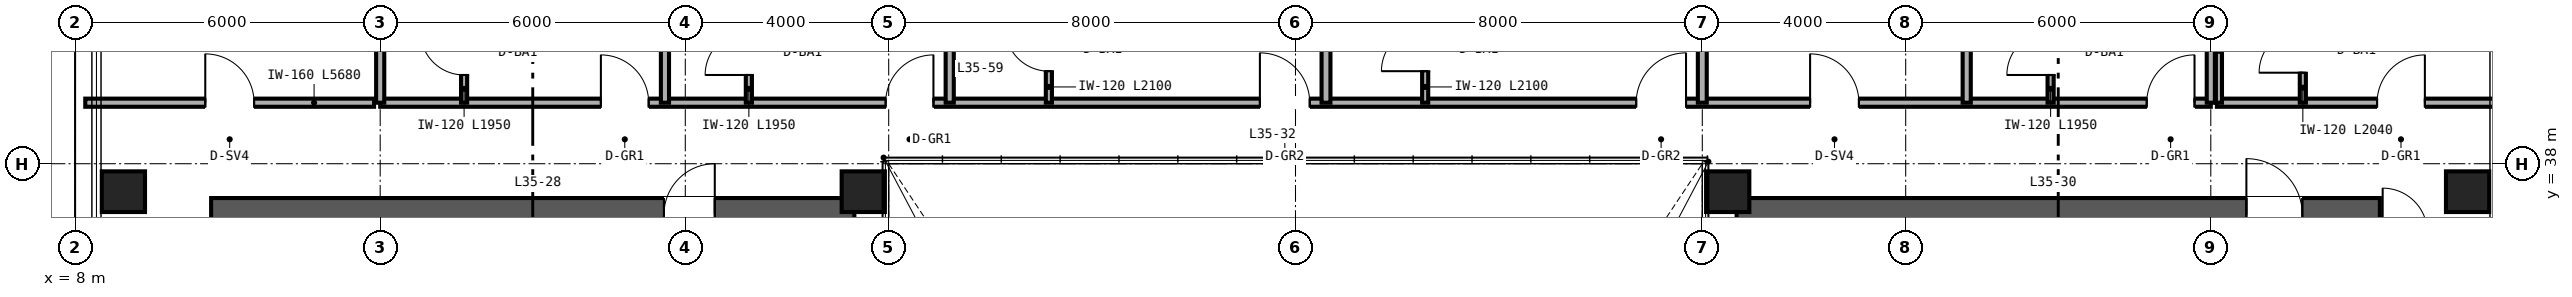
"""IFC4 building model, lengths in metres.
Left out: names, types, materials, properties, quantities, classifications, styles, units other than length and angle.
Written with IfcOpenShell. Run it as: python <this file> out.ifc"""

import sys

from ifc_helpers import new_model, si_unit, direction, frame, frame_2d, origin, origin_2d, place, context, subcontext, project, spatial, rectangle, hollow_rectangle, extrude, source, transform, mapped, element, fill, save


model = new_model("IFC4")
c1 = context("Model", 3, precision=1e-05, world=origin(), true_north=direction((0.0, 1.0)))
c2 = subcontext(c1, "Body", "Model", "MODEL_VIEW")
j1 = project(units=[si_unit("LENGTHUNIT", "METRE"), si_unit("PLANEANGLEUNIT", "RADIAN")], contexts=[c1])
p1 = place(None, origin())
s1 = spatial("IfcSite", under=j1, at=p1, CompositionType="ELEMENT")
p2 = place(p1, origin())
s2 = spatial("IfcBuilding", under=s1, at=p2, CompositionType="ELEMENT")
p3 = place(p2, frame((0.0, 0.0, 140.4)))
s3 = spatial("IfcBuildingStorey", under=s2, at=p3, CompositionType="ELEMENT", Elevation=140.4)
p4 = place(p3, frame((10.675, 37.0, 0.0), z_axis=(0.0, 0.0, 1.0), x_axis=(1.0, 0.0, 0.0)))
e1 = element("IfcWall", 1, at=p4, inside=s3, PredefinedType="SHEAR", context=c2, shape_type="SweptSolid", body=[
    extrude(rectangle(XDim=12.65, YDim=0.65, at=frame_2d((6.325, 0.0))), origin(), (0.0, 0.0, 1.0), 3.36),
])
p5 = place(p4, frame((8.905, 0.0, 0.0)))
e2 = element("IfcOpeningElement", 2, at=p5, cuts=e1, PredefinedType="OPENING", context=c2, shape_type="SweptSolid", body=[
    extrude(rectangle(XDim=1.0, YDim=2.15, at=frame_2d((0.5, 1.075))), frame((0.0, 0.335, 0.0), z_axis=(0.0, -1.0, 0.0), x_axis=(1.0, 0.0, 0.0)), (0.0, 0.0, 1.0), 0.67),
])
p6 = place(p3, frame((40.675, 37.0, 0.0), z_axis=(0.0, 0.0, 1.0), x_axis=(1.0, 0.0, 0.0)))
e3 = element("IfcWall", 3, at=p6, inside=s3, PredefinedType="SHEAR", context=c2, shape_type="SweptSolid", body=[
    extrude(rectangle(XDim=12.65, YDim=0.65, at=frame_2d((6.325, 0.0))), origin(), (0.0, 0.0, 1.0), 3.36),
])
p7 = place(p6, frame((10.025, 0.0, 0.0)))
e4 = element("IfcOpeningElement", 4, at=p7, cuts=e3, PredefinedType="OPENING", context=c2, shape_type="SweptSolid", body=[
    extrude(rectangle(XDim=1.1, YDim=2.15, at=frame_2d((0.55, 1.075))), frame((0.0, 0.335, 0.0), z_axis=(0.0, -1.0, 0.0), x_axis=(1.0, 0.0, 0.0)), (0.0, 0.0, 1.0), 0.67),
])
m1 = source(origin(), c2, "Body", "SweptSolid", [
    extrude(hollow_rectangle(XDim=0.85, YDim=0.8, WallThickness=0.032, at=origin_2d()), origin(), (0.0, 0.0, 1.0), 3.36),
])
for number, where, z_axis, x_axis in (
    (5, (8.95, 37.45, 0.0), (0.0, 0.0, 1.0), (1.0, 0.0, 0.0)),
    (6, (23.5, 37.45, 0.0), (0.0, 0.0, 1.0), (1.0, 0.0, 0.0)),
    (7, (40.5, 37.45, 0.0), (0.0, 0.0, 1.0), (1.0, 0.0, 0.0)),
    (8, (55.05, 37.45, 0.0), (0.0, 0.0, 1.0), (1.0, 0.0, 0.0)),
):
    element("IfcColumn", number, at=place(p3, frame(where, z_axis=z_axis, x_axis=x_axis)), inside=s3, PredefinedType="COLUMN", context=c2, shape_type="MappedRepresentation", body=[
        mapped(m1, transform((0.0, 0.0, 0.0), scale=1.0)),
    ])
p8 = place(p3, frame((8.2, 39.2, 0.0), z_axis=(0.0, 0.0, 1.0), x_axis=(1.0, 0.0, 0.0)))
e9 = element("IfcWall", 9, at=p8, inside=s3, PredefinedType="PARTITIONING", context=c2, shape_type="SweptSolid", body=[
    extrude(rectangle(XDim=5.68, YDim=0.16, at=frame_2d((2.84, 0.0))), origin(), (0.0, 0.0, 1.0), 3.36),
])
p9 = place(p8, frame((2.36, 0.0, 0.0)))
e10 = element("IfcOpeningElement", 10, at=p9, cuts=e9, PredefinedType="OPENING", context=c2, shape_type="SweptSolid", body=[
    extrude(rectangle(XDim=0.96, YDim=2.15, at=frame_2d((0.48, 1.075))), frame((0.0, 0.09, 0.0), z_axis=(0.0, -1.0, 0.0), x_axis=(1.0, 0.0, 0.0)), (0.0, 0.0, 1.0), 0.18),
])
p10 = place(p3, frame((50.12, 39.2, 0.0), z_axis=(0.0, 0.0, 1.0), x_axis=(1.0, 0.0, 0.0)))
e11 = element("IfcWall", 11, at=p10, inside=s3, PredefinedType="PARTITIONING", context=c2, shape_type="SweptSolid", body=[
    extrude(rectangle(XDim=5.68, YDim=0.16, at=frame_2d((2.84, 0.0))), origin(), (0.0, 0.0, 1.0), 3.36),
])
p11 = place(p10, frame((3.15, 0.0, 0.0)))
e12 = element("IfcOpeningElement", 12, at=p11, cuts=e11, PredefinedType="OPENING", context=c2, shape_type="SweptSolid", body=[
    extrude(rectangle(XDim=0.94, YDim=2.15, at=frame_2d((0.47, 1.075))), frame((0.0, 0.09, 0.0), z_axis=(0.0, -1.0, 0.0), x_axis=(1.0, 0.0, 0.0)), (0.0, 0.0, 1.0), 0.18),
])
p12 = place(p3, frame((51.81, 39.2, 0.0), z_axis=(0.0, 0.0, 1.0), x_axis=(0.0, 1.0, 0.0)))
e13 = element("IfcWall", 13, at=p12, inside=s3, PredefinedType="PARTITIONING", context=c2, shape_type="SweptSolid", body=[
    extrude(rectangle(XDim=2.04, YDim=0.12, at=frame_2d((1.02, 0.0))), origin(), (0.0, 0.0, 1.0), 3.36),
])
p13 = place(p12, frame((0.59, 0.0, 0.0)))
e14 = element("IfcOpeningElement", 14, at=p13, cuts=e13, PredefinedType="OPENING", context=c2, shape_type="SweptSolid", body=[
    extrude(rectangle(XDim=0.86, YDim=2.1, at=frame_2d((0.43, 1.05))), frame((0.0, 0.07, 0.0), z_axis=(0.0, -1.0, 0.0), x_axis=(1.0, 0.0, 0.0)), (0.0, 0.0, 1.0), 0.14),
])
p14 = place(p3, frame((50.16, 39.2, 0.0), z_axis=(0.0, 0.0, 1.0), x_axis=(0.0, 1.0, 0.0)))
e15 = element("IfcWall", 15, at=p14, inside=s3, PredefinedType="PARTITIONING", context=c2, shape_type="SweptSolid", body=[
    extrude(rectangle(XDim=2.04, YDim=0.12, at=frame_2d((1.02, 0.0))), origin(), (0.0, 0.0, 1.0), 3.36),
])
p15 = place(p3, frame((14.0, 39.2, 0.0), z_axis=(0.0, 0.0, 1.0), x_axis=(1.0, 0.0, 0.0)))
e16 = element("IfcWall", 16, at=p15, inside=s3, PredefinedType="PARTITIONING", context=c2, shape_type="SweptSolid", body=[
    extrude(rectangle(XDim=36.0, YDim=0.16, at=frame_2d((18.0, 0.0))), origin(), (0.0, 0.0, 1.0), 2.581),
])
p16 = place(p15, frame((4.34, 0.0, 0.0)))
e17 = element("IfcOpeningElement", 17, at=p16, cuts=e16, PredefinedType="OPENING", context=c2, shape_type="SweptSolid", body=[
    extrude(rectangle(XDim=0.94, YDim=2.15, at=frame_2d((0.47, 1.075))), frame((0.0, 0.09, 0.0), z_axis=(0.0, -1.0, 0.0), x_axis=(1.0, 0.0, 0.0)), (0.0, 0.0, 1.0), 0.18),
])
p17 = place(p15, frame((9.94, 0.0, 0.0)))
e18 = element("IfcOpeningElement", 18, at=p17, cuts=e16, PredefinedType="OPENING", context=c2, shape_type="SweptSolid", body=[
    extrude(rectangle(XDim=0.94, YDim=2.15, at=frame_2d((0.47, 1.075))), frame((0.0, 0.09, 0.0), z_axis=(0.0, -1.0, 0.0), x_axis=(1.0, 0.0, 0.0)), (0.0, 0.0, 1.0), 0.18),
])
p18 = place(p15, frame((17.3, 0.0, 0.0)))
e19 = element("IfcOpeningElement", 19, at=p18, cuts=e16, PredefinedType="OPENING", context=c2, shape_type="SweptSolid", body=[
    extrude(rectangle(XDim=0.98, YDim=2.2, at=frame_2d((0.49, 1.1))), frame((0.0, 0.09, 0.0), z_axis=(0.0, -1.0, 0.0), x_axis=(1.0, 0.0, 0.0)), (0.0, 0.0, 1.0), 0.18),
])
p19 = place(p15, frame((24.7, 0.0, 0.0)))
e20 = element("IfcOpeningElement", 20, at=p19, cuts=e16, PredefinedType="OPENING", context=c2, shape_type="SweptSolid", body=[
    extrude(rectangle(XDim=0.98, YDim=2.2, at=frame_2d((0.49, 1.1))), frame((0.0, 0.09, 0.0), z_axis=(0.0, -1.0, 0.0), x_axis=(1.0, 0.0, 0.0)), (0.0, 0.0, 1.0), 0.18),
])
p20 = place(p15, frame((28.12, 0.0, 0.0)))
e21 = element("IfcOpeningElement", 21, at=p20, cuts=e16, PredefinedType="OPENING", context=c2, shape_type="SweptSolid", body=[
    extrude(rectangle(XDim=0.96, YDim=2.15, at=frame_2d((0.48, 1.075))), frame((0.0, 0.09, 0.0), z_axis=(0.0, -1.0, 0.0), x_axis=(1.0, 0.0, 0.0)), (0.0, 0.0, 1.0), 0.18),
])
p21 = place(p15, frame((34.74, 0.0, 0.0)))
e22 = element("IfcOpeningElement", 22, at=p21, cuts=e16, PredefinedType="OPENING", context=c2, shape_type="SweptSolid", body=[
    extrude(rectangle(XDim=0.94, YDim=2.15, at=frame_2d((0.47, 1.075))), frame((0.0, 0.09, 0.0), z_axis=(0.0, -1.0, 0.0), x_axis=(1.0, 0.0, 0.0)), (0.0, 0.0, 1.0), 0.18),
])
for number, where, z_axis, x_axis in (
    (23, (14.0, 39.2, 0.0), (0.0, 0.0, 1.0), (0.0, 1.0, 0.0)),
    (24, (50.0, 39.2, 0.0), (0.0, 0.0, 1.0), (0.0, 1.0, 0.0)),
    (25, (19.6, 39.2, 0.0), (0.0, 0.0, 1.0), (0.0, 1.0, 0.0)),
):
    element("IfcWall", number, at=place(p3, frame(where, z_axis=z_axis, x_axis=x_axis)), inside=s3, PredefinedType="PARTITIONING", context=c2, shape_type="SweptSolid", body=[
        extrude(rectangle(XDim=10.44, YDim=0.16, at=frame_2d((5.22, 0.0))), origin(), (0.0, 0.0, 1.0), 2.667),
    ])
p22 = place(p3, frame((15.65, 39.2, 0.0), z_axis=(0.0, 0.0, 1.0), x_axis=(0.0, 1.0, 0.0)))
e26 = element("IfcWall", 26, at=p22, inside=s3, PredefinedType="PARTITIONING", context=c2, shape_type="SweptSolid", body=[
    extrude(rectangle(XDim=1.95, YDim=0.12, at=frame_2d((0.975, 0.0))), origin(), (0.0, 0.0, 1.0), 3.36),
])
p23 = place(p22, frame((0.545, 0.0, 0.0)))
e27 = element("IfcOpeningElement", 27, at=p23, cuts=e26, PredefinedType="OPENING", context=c2, shape_type="SweptSolid", body=[
    extrude(rectangle(XDim=0.86, YDim=2.1, at=frame_2d((0.43, 1.05))), frame((0.0, 0.07, 0.0), z_axis=(0.0, -1.0, 0.0), x_axis=(1.0, 0.0, 0.0)), (0.0, 0.0, 1.0), 0.14),
])
p24 = place(p3, frame((25.2, 39.2, 0.0), z_axis=(0.0, 0.0, 1.0), x_axis=(0.0, 1.0, 0.0)))
e28 = element("IfcWall", 28, at=p24, inside=s3, PredefinedType="PARTITIONING", context=c2, shape_type="SweptSolid", body=[
    extrude(rectangle(XDim=10.44, YDim=0.16, at=frame_2d((5.22, 0.0))), origin(), (0.0, 0.0, 1.0), 2.433),
])
p25 = place(p3, frame((21.25, 39.2, 0.0), z_axis=(0.0, 0.0, 1.0), x_axis=(0.0, 1.0, 0.0)))
e29 = element("IfcWall", 29, at=p25, inside=s3, PredefinedType="PARTITIONING", context=c2, shape_type="SweptSolid", body=[
    extrude(rectangle(XDim=1.95, YDim=0.12, at=frame_2d((0.975, 0.0))), origin(), (0.0, 0.0, 1.0), 3.36),
])
p26 = place(p25, frame((0.545, 0.0, 0.0)))
e30 = element("IfcOpeningElement", 30, at=p26, cuts=e29, PredefinedType="OPENING", context=c2, shape_type="SweptSolid", body=[
    extrude(rectangle(XDim=0.86, YDim=2.1, at=frame_2d((0.43, 1.05))), frame((0.0, 0.07, 0.0), z_axis=(0.0, -1.0, 0.0), x_axis=(1.0, 0.0, 0.0)), (0.0, 0.0, 1.0), 0.14),
])
p27 = place(p3, frame((32.6, 39.2, 0.0), z_axis=(0.0, 0.0, 1.0), x_axis=(0.0, 1.0, 0.0)))
e31 = element("IfcWall", 31, at=p27, inside=s3, PredefinedType="PARTITIONING", context=c2, shape_type="SweptSolid", body=[
    extrude(rectangle(XDim=10.44, YDim=0.175, at=frame_2d((5.22, 0.0))), origin(), (0.0, 0.0, 1.0), 2.433),
])
p28 = place(p3, frame((27.15, 39.2, 0.0), z_axis=(0.0, 0.0, 1.0), x_axis=(0.0, 1.0, 0.0)))
e32 = element("IfcWall", 32, at=p28, inside=s3, PredefinedType="PARTITIONING", context=c2, shape_type="SweptSolid", body=[
    extrude(rectangle(XDim=2.1, YDim=0.12, at=frame_2d((1.05, 0.0))), origin(), (0.0, 0.0, 1.0), 3.36),
])
p29 = place(p28, frame((0.62, 0.0, 0.0)))
e33 = element("IfcOpeningElement", 33, at=p29, cuts=e32, PredefinedType="OPENING", context=c2, shape_type="SweptSolid", body=[
    extrude(rectangle(XDim=0.86, YDim=2.1, at=frame_2d((0.43, 1.05))), frame((0.0, 0.07, 0.0), z_axis=(0.0, -1.0, 0.0), x_axis=(1.0, 0.0, 0.0)), (0.0, 0.0, 1.0), 0.14),
])
p30 = place(p3, frame((40.0, 39.2, 0.0), z_axis=(0.0, 0.0, 1.0), x_axis=(0.0, 1.0, 0.0)))
e34 = element("IfcWall", 34, at=p30, inside=s3, PredefinedType="PARTITIONING", context=c2, shape_type="SweptSolid", body=[
    extrude(rectangle(XDim=10.44, YDim=0.175, at=frame_2d((5.22, 0.0))), origin(), (0.0, 0.0, 1.0), 2.433),
])
p31 = place(p3, frame((34.55, 39.2, 0.0), z_axis=(0.0, 0.0, 1.0), x_axis=(0.0, 1.0, 0.0)))
e35 = element("IfcWall", 35, at=p31, inside=s3, PredefinedType="PARTITIONING", context=c2, shape_type="SweptSolid", body=[
    extrude(rectangle(XDim=2.1, YDim=0.12, at=frame_2d((1.05, 0.0))), origin(), (0.0, 0.0, 1.0), 3.36),
])
p32 = place(p31, frame((0.62, 0.0, 0.0)))
e36 = element("IfcOpeningElement", 36, at=p32, cuts=e35, PredefinedType="OPENING", context=c2, shape_type="SweptSolid", body=[
    extrude(rectangle(XDim=0.86, YDim=2.1, at=frame_2d((0.43, 1.05))), frame((0.0, 0.07, 0.0), z_axis=(0.0, -1.0, 0.0), x_axis=(1.0, 0.0, 0.0)), (0.0, 0.0, 1.0), 0.14),
])
p33 = place(p3, frame((45.2, 39.2, 0.0), z_axis=(0.0, 0.0, 1.0), x_axis=(0.0, 1.0, 0.0)))
e37 = element("IfcWall", 37, at=p33, inside=s3, PredefinedType="PARTITIONING", context=c2, shape_type="SweptSolid", body=[
    extrude(rectangle(XDim=10.44, YDim=0.16, at=frame_2d((5.22, 0.0))), origin(), (0.0, 0.0, 1.0), 2.667),
])
p34 = place(p3, frame((46.85, 39.2, 0.0), z_axis=(0.0, 0.0, 1.0), x_axis=(0.0, 1.0, 0.0)))
e38 = element("IfcWall", 38, at=p34, inside=s3, PredefinedType="PARTITIONING", context=c2, shape_type="SweptSolid", body=[
    extrude(rectangle(XDim=1.95, YDim=0.12, at=frame_2d((0.975, 0.0))), origin(), (0.0, 0.0, 1.0), 3.36),
])
p35 = place(p34, frame((0.545, 0.0, 0.0)))
e39 = element("IfcOpeningElement", 39, at=p35, cuts=e38, PredefinedType="OPENING", context=c2, shape_type="SweptSolid", body=[
    extrude(rectangle(XDim=0.86, YDim=2.1, at=frame_2d((0.43, 1.05))), frame((0.0, 0.07, 0.0), z_axis=(0.0, -1.0, 0.0), x_axis=(1.0, 0.0, 0.0)), (0.0, 0.0, 1.0), 0.14),
])
m2 = source(origin(), c2, "Body", "SweptSolid", [
    extrude(rectangle(XDim=1.0, YDim=2.15, at=frame_2d((0.5, 1.075))), frame((0.0, 0.025, 0.0), z_axis=(0.0, -1.0, 0.0), x_axis=(1.0, 0.0, 0.0)), (0.0, 0.0, 1.0), 0.05),
])
p36 = place(p5, origin())
e40 = element("IfcDoor", 40, at=p36, inside=s3, OperationType="SINGLE_SWING_RIGHT", PredefinedType="DOOR", context=c2, shape_type="MappedRepresentation", body=[
    mapped(m2, transform((0.0, 0.0, 0.0), scale=1.0)),
])
fill(e2, e40)
m3 = source(origin(), c2, "Body", "SweptSolid", [
    extrude(rectangle(XDim=1.1, YDim=2.15, at=frame_2d((0.55, 1.075))), frame((0.0, 0.025, 0.0), z_axis=(0.0, -1.0, 0.0), x_axis=(1.0, 0.0, 0.0)), (0.0, 0.0, 1.0), 0.05),
])
p37 = place(p7, origin())
e41 = element("IfcDoor", 41, at=p37, inside=s3, OperationType="SINGLE_SWING_LEFT", PredefinedType="DOOR", context=c2, shape_type="MappedRepresentation", body=[
    mapped(m3, transform((0.0, 0.0, 0.0), scale=1.0)),
])
fill(e4, e41)
m4 = source(origin(), c2, "Body", "SweptSolid", [
    extrude(rectangle(XDim=0.96, YDim=2.15, at=frame_2d((0.48, 1.075))), frame((0.0, 0.025, 0.0), z_axis=(0.0, -1.0, 0.0), x_axis=(1.0, 0.0, 0.0)), (0.0, 0.0, 1.0), 0.05),
])
p38 = place(p9, origin())
e42 = element("IfcDoor", 42, at=p38, inside=s3, OperationType="SINGLE_SWING_LEFT", PredefinedType="DOOR", context=c2, shape_type="MappedRepresentation", body=[
    mapped(m4, transform((0.0, 0.0, 0.0), scale=1.0)),
])
fill(e10, e42)
m5 = source(origin(), c2, "Body", "SweptSolid", [
    extrude(rectangle(XDim=0.86, YDim=2.1, at=frame_2d((0.43, 1.05))), frame((0.0, 0.025, 0.0), z_axis=(0.0, -1.0, 0.0), x_axis=(1.0, 0.0, 0.0)), (0.0, 0.0, 1.0), 0.05),
])
p39 = place(p13, origin())
e43 = element("IfcDoor", 43, at=p39, inside=s3, OperationType="SINGLE_SWING_LEFT", PredefinedType="DOOR", context=c2, shape_type="MappedRepresentation", body=[
    mapped(m5, transform((0.0, 0.0, 0.0), scale=1.0)),
])
fill(e14, e43)
m6 = source(origin(), c2, "Body", "SweptSolid", [
    extrude(rectangle(XDim=0.94, YDim=2.15, at=frame_2d((0.47, 1.075))), frame((0.0, 0.025, 0.0), z_axis=(0.0, -1.0, 0.0), x_axis=(1.0, 0.0, 0.0)), (0.0, 0.0, 1.0), 0.05),
])
p40 = place(p11, origin())
e44 = element("IfcDoor", 44, at=p40, inside=s3, OperationType="SINGLE_SWING_RIGHT", PredefinedType="DOOR", context=c2, shape_type="MappedRepresentation", body=[
    mapped(m6, transform((0.0, 0.0, 0.0), scale=1.0)),
])
fill(e12, e44)
p41 = place(p23, origin())
e45 = element("IfcDoor", 45, at=p41, inside=s3, OperationType="SINGLE_SWING_RIGHT", PredefinedType="DOOR", context=c2, shape_type="MappedRepresentation", body=[
    mapped(m5, transform((0.0, 0.0, 0.0), scale=1.0)),
])
fill(e27, e45)
p42 = place(p26, origin())
e46 = element("IfcDoor", 46, at=p42, inside=s3, OperationType="SINGLE_SWING_LEFT", PredefinedType="DOOR", context=c2, shape_type="MappedRepresentation", body=[
    mapped(m5, transform((0.0, 0.0, 0.0), scale=1.0)),
])
fill(e30, e46)
p43 = place(p29, origin())
e47 = element("IfcDoor", 47, at=p43, inside=s3, OperationType="SINGLE_SWING_RIGHT", PredefinedType="DOOR", context=c2, shape_type="MappedRepresentation", body=[
    mapped(m5, transform((0.0, 0.0, 0.0), scale=1.0)),
])
fill(e33, e47)
p44 = place(p32, origin())
e48 = element("IfcDoor", 48, at=p44, inside=s3, OperationType="SINGLE_SWING_LEFT", PredefinedType="DOOR", context=c2, shape_type="MappedRepresentation", body=[
    mapped(m5, transform((0.0, 0.0, 0.0), scale=1.0)),
])
fill(e36, e48)
p45 = place(p35, origin())
e49 = element("IfcDoor", 49, at=p45, inside=s3, OperationType="SINGLE_SWING_LEFT", PredefinedType="DOOR", context=c2, shape_type="MappedRepresentation", body=[
    mapped(m5, transform((0.0, 0.0, 0.0), scale=1.0)),
])
fill(e39, e49)
p46 = place(p16, origin())
e50 = element("IfcDoor", 50, at=p46, inside=s3, OperationType="SINGLE_SWING_LEFT", PredefinedType="DOOR", context=c2, shape_type="MappedRepresentation", body=[
    mapped(m6, transform((0.0, 0.0, 0.0), scale=1.0)),
])
fill(e17, e50)
p47 = place(p17, origin())
e51 = element("IfcDoor", 51, at=p47, inside=s3, OperationType="SINGLE_SWING_RIGHT", PredefinedType="DOOR", context=c2, shape_type="MappedRepresentation", body=[
    mapped(m6, transform((0.0, 0.0, 0.0), scale=1.0)),
])
fill(e18, e51)
m7 = source(origin(), c2, "Body", "SweptSolid", [
    extrude(rectangle(XDim=0.98, YDim=2.2, at=frame_2d((0.49, 1.1))), frame((0.0, 0.025, 0.0), z_axis=(0.0, -1.0, 0.0), x_axis=(1.0, 0.0, 0.0)), (0.0, 0.0, 1.0), 0.05),
])
p48 = place(p18, origin())
e52 = element("IfcDoor", 52, at=p48, inside=s3, OperationType="SINGLE_SWING_LEFT", PredefinedType="DOOR", context=c2, shape_type="MappedRepresentation", body=[
    mapped(m7, transform((0.0, 0.0, 0.0), scale=1.0)),
])
fill(e19, e52)
p49 = place(p19, origin())
e53 = element("IfcDoor", 53, at=p49, inside=s3, OperationType="SINGLE_SWING_RIGHT", PredefinedType="DOOR", context=c2, shape_type="MappedRepresentation", body=[
    mapped(m7, transform((0.0, 0.0, 0.0), scale=1.0)),
])
fill(e20, e53)
p50 = place(p20, origin())
e54 = element("IfcDoor", 54, at=p50, inside=s3, OperationType="SINGLE_SWING_LEFT", PredefinedType="DOOR", context=c2, shape_type="MappedRepresentation", body=[
    mapped(m4, transform((0.0, 0.0, 0.0), scale=1.0)),
])
fill(e21, e54)
p51 = place(p21, origin())
e55 = element("IfcDoor", 55, at=p51, inside=s3, OperationType="SINGLE_SWING_RIGHT", PredefinedType="DOOR", context=c2, shape_type="MappedRepresentation", body=[
    mapped(m6, transform((0.0, 0.0, 0.0), scale=1.0)),
])
fill(e22, e55)
save(model, sys.argv[1])
